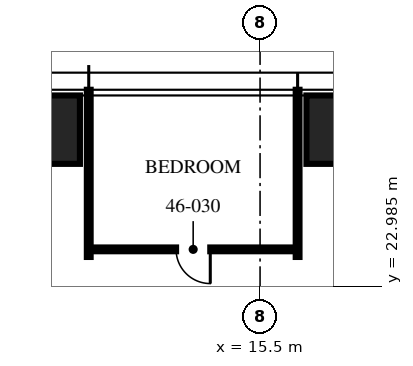
"""IFC4 building model, lengths in metres.
Left out: names, types, materials, properties, quantities, classifications, styles, units other than length and angle.
Written with IfcOpenShell. Run it as: python <this file> out.ifc"""

import sys

from ifc_helpers import new_model, si_unit, direction, frame, frame_2d, origin, origin_2d, place, context, subcontext, project, spatial, rectangle, hollow_rectangle, extrude, element, fill, save


model = new_model("IFC4")
c1 = context("Model", 3, precision=1e-05, world=origin(), true_north=direction((0.0, 1.0)))
c2 = subcontext(c1, "Body", "Model", "MODEL_VIEW")
j1 = project(units=[si_unit("LENGTHUNIT", "METRE"), si_unit("PLANEANGLEUNIT", "RADIAN")], contexts=[c1])
p1 = place(None, origin())
s1 = spatial("IfcSite", under=j1, at=p1, CompositionType="ELEMENT")
p2 = place(p1, origin())
s2 = spatial("IfcBuilding", under=s1, at=p2, CompositionType="ELEMENT")
p3 = place(p2, frame((0.0, 0.0, 182.25)))
s3 = spatial("IfcBuildingStorey", under=s2, at=p3, CompositionType="ELEMENT", Elevation=182.25)
for number, where, z_axis, x_axis in (
    (1, (9.16, 27.1, 0.0), (0.0, 0.0, 1.0), (1.0, 0.0, 0.0)),
    (2, (18.32, 27.1, 0.0), (0.0, 0.0, 1.0), (1.0, 0.0, 0.0)),
):
    element("IfcColumn", number, at=place(p3, frame(where, z_axis=z_axis, x_axis=x_axis)), inside=s3, PredefinedType="COLUMN", context=c2, shape_type="SweptSolid", body=[
        extrude(hollow_rectangle(XDim=3.2, YDim=1.8, WallThickness=0.2, at=origin_2d()), origin(), (0.0, 0.0, 1.0), 3.75),
    ])
for number, where, z_axis, x_axis in (
    (3, (16.488, 23.75, 0.0), (0.0, 0.0, 1.0), (0.0, 1.0, 0.0)),
    (4, (10.992, 23.75, 0.0), (0.0, 0.0, 1.0), (0.0, 1.0, 0.0)),
):
    element("IfcWall", number, at=place(p3, frame(where, z_axis=z_axis, x_axis=x_axis)), inside=s3, PredefinedType="PARTITIONING", context=c2, shape_type="SweptSolid", body=[
        extrude(rectangle(XDim=4.4, YDim=0.1, at=frame_2d((2.2, 0.0))), origin(), (0.0, 0.0, 1.0), 2.56),
    ])
p4 = place(p3, frame((16.488, 23.95, 0.0), z_axis=(0.0, 0.0, 1.0), x_axis=(-1.0, 0.0, 0.0)))
e5 = element("IfcWall", 5, at=p4, inside=s3, PredefinedType="PARTITIONING", context=c2, shape_type="SweptSolid", body=[
    extrude(rectangle(XDim=5.496, YDim=0.1, at=frame_2d((2.748, 0.0))), origin(), (0.0, 0.0, 1.0), 2.56),
])
p5 = place(p4, frame((2.298, 0.0, 0.0)))
e6 = element("IfcOpeningElement", 6, at=p5, cuts=e5, PredefinedType="OPENING", context=c2, shape_type="SweptSolid", body=[
    extrude(rectangle(XDim=0.9, YDim=2.1, at=frame_2d((0.45, 1.05))), frame((0.0, 0.06, 0.0), z_axis=(0.0, -1.0, 0.0), x_axis=(1.0, 0.0, 0.0)), (0.0, 0.0, 1.0), 0.12),
])
p6 = place(p5, origin())
e7 = element("IfcDoor", 7, at=p6, inside=s3, OperationType="SINGLE_SWING_LEFT", PredefinedType="DOOR", context=c2, shape_type="SweptSolid", body=[
    extrude(rectangle(XDim=0.9, YDim=2.1, at=frame_2d((0.45, 1.05))), frame((0.0, 0.025, 0.0), z_axis=(0.0, -1.0, 0.0), x_axis=(1.0, 0.0, 0.0)), (0.0, 0.0, 1.0), 0.05),
])
fill(e6, e7)
save(model, sys.argv[1])
